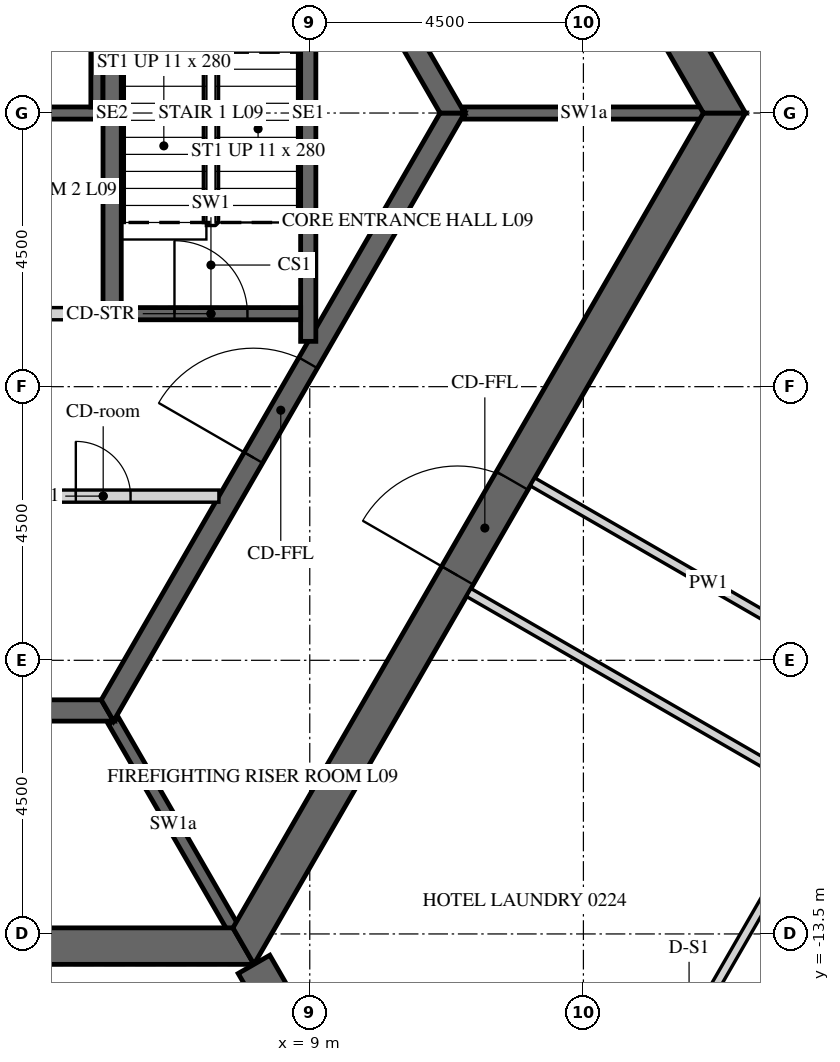
"""IFC4 building model, lengths in metres.
Left out: names, types, materials, properties, quantities, classifications, styles, units other than length and angle.
Written with IfcOpenShell. Run it as: python <this file> out.ifc"""

import sys

from ifc_helpers import new_model, si_unit, direction, frame, frame_2d, origin, place, context, subcontext, project, spatial, polyline, rectangle, outline, extrude, element, fill, save


model = new_model("IFC4")
c1 = context("Model", 3, precision=1e-05, world=origin(), true_north=direction((0.0, 1.0)))
c2 = subcontext(c1, "Body", "Model", "MODEL_VIEW")
j1 = project(units=[si_unit("LENGTHUNIT", "METRE"), si_unit("PLANEANGLEUNIT", "RADIAN")], contexts=[c1])
p1 = place(None, origin())
s1 = spatial("IfcSite", under=j1, at=p1, CompositionType="ELEMENT")
p2 = place(p1, origin())
s2 = spatial("IfcBuilding", under=s1, at=p2, CompositionType="ELEMENT")
p3 = place(p2, frame((0.0, 0.0, 49.2)))
s3 = spatial("IfcBuildingStorey", under=s2, at=p3, CompositionType="ELEMENT", Elevation=49.2)
p4 = place(p3, frame((-7.91, -13.7, -0.15), z_axis=(0.0, 0.0, 1.0), x_axis=(1.0, 0.0, 0.0)))
e1 = element("IfcWall", 1, at=p4, inside=s3, PredefinedType="SHEAR", context=c2, shape_type="SweptSolid", body=[
    extrude(outline(polyline([(-0.173, -0.3), (15.993, -0.3), (15.646, 0.3), (0.173, 0.3), (-0.173, -0.3)])), origin(), (0.0, 0.0, 1.0), 3.9),
])
p5 = place(p4, frame((7.31, 0.0, 0.15)))
e2 = element("IfcOpeningElement", 2, at=p5, cuts=e1, PredefinedType="OPENING", context=c2, shape_type="SweptSolid", body=[
    extrude(rectangle(XDim=1.2, YDim=2.4, at=frame_2d((0.6, 1.2))), frame((0.0, 0.31, 0.0), z_axis=(0.0, -1.0, 0.0), x_axis=(1.0, 0.0, 0.0)), (0.0, 0.0, 1.0), 0.62),
])
p6 = place(p3, frame((7.91, -13.7, -0.15), z_axis=(0.0, 0.0, 1.0), x_axis=(0.499999880136, 0.866025472988, 0.0)))
e3 = element("IfcWall", 3, at=p6, inside=s3, PredefinedType="SHEAR", context=c2, shape_type="SweptSolid", body=[
    extrude(outline(polyline([(-0.173, -0.3), (15.993, -0.3), (15.646, 0.3), (0.173, 0.3), (-0.173, -0.3)])), origin(), (0.0, 0.0, 1.0), 3.9),
])
p7 = place(p6, frame((7.039, 0.0, 0.15)))
e4 = element("IfcOpeningElement", 4, at=p7, cuts=e3, PredefinedType="OPENING", context=c2, shape_type="SweptSolid", body=[
    extrude(rectangle(XDim=1.8, YDim=2.4, at=frame_2d((0.9, 1.2))), frame((0.0, 0.31, 0.0), z_axis=(0.0, -1.0, 0.0), x_axis=(1.0, 0.0, 0.0)), (0.0, 0.0, 1.0), 0.62),
])
p8 = place(p3, frame((15.819, 0.0, -0.15), z_axis=(0.0, 0.0, 1.0), x_axis=(-0.499999880136, 0.866025472988, 0.0)))
e5 = element("IfcWall", 5, at=p8, inside=s3, PredefinedType="SHEAR", context=c2, shape_type="SweptSolid", body=[
    extrude(outline(polyline([(-0.173, -0.3), (15.993, -0.3), (15.646, 0.3), (0.173, 0.3), (-0.173, -0.3)])), origin(), (0.0, 0.0, 1.0), 3.9),
])
p9 = place(p8, frame((6.981, 0.0, 0.15)))
e6 = element("IfcOpeningElement", 6, at=p9, cuts=e5, PredefinedType="OPENING", context=c2, shape_type="SweptSolid", body=[
    extrude(rectangle(XDim=1.8, YDim=2.4, at=frame_2d((0.9, 1.2))), frame((0.0, 0.31, 0.0), z_axis=(0.0, -1.0, 0.0), x_axis=(1.0, 0.0, 0.0)), (0.0, 0.0, 1.0), 0.62),
])
p10 = place(p3, frame((8.083, -14.0, -0.15), z_axis=(0.0, 0.0, 1.0), x_axis=(0.499997680643, -0.866026742862, 0.0)))
e7 = element("IfcWall", 7, at=p10, inside=s3, PredefinedType="SHEAR", context=c2, shape_type="SweptSolid", body=[
    extrude(rectangle(XDim=16.509, YDim=0.6, at=frame_2d((8.254, 0.0))), origin(), (0.0, 0.0, 1.0), 3.9),
])
p11 = place(p10, frame((7.354, 0.0, 0.15)))
e8 = element("IfcOpeningElement", 8, at=p11, cuts=e7, PredefinedType="OPENING", context=c2, shape_type="SweptSolid", body=[
    extrude(rectangle(XDim=1.8, YDim=2.4, at=frame_2d((0.9, 1.2))), frame((0.0, 0.31, 0.0), z_axis=(0.0, -1.0, 0.0), x_axis=(1.0, 0.0, 0.0)), (0.0, 0.0, 1.0), 0.62),
])
p12 = place(p3, frame((-5.673, -9.825, -0.15), z_axis=(0.0, 0.0, 1.0), x_axis=(1.0, 0.0, 0.0)))
e9 = element("IfcWall", 9, at=p12, inside=s3, PredefinedType="SHEAR", context=c2, shape_type="SweptSolid", body=[
    extrude(outline(polyline([(-0.101, -0.175), (11.446, -0.175), (11.244, 0.175), (0.101, 0.175), (-0.101, -0.175)])), origin(), (0.0, 0.0, 1.0), 3.9),
])
p13 = place(p3, frame((5.673, -9.825, -0.15), z_axis=(0.0, 0.0, 1.0), x_axis=(0.499995046907, 0.866028263435, 0.0)))
e10 = element("IfcWall", 10, at=p13, inside=s3, PredefinedType="SHEAR", context=c2, shape_type="SweptSolid", body=[
    extrude(outline(polyline([(-0.101, -0.175), (11.446, -0.175), (11.244, 0.175), (0.101, 0.175), (-0.101, -0.175)])), origin(), (0.0, 0.0, 1.0), 3.9),
])
p14 = place(p13, frame((4.801, 0.0, 0.15)))
e11 = element("IfcOpeningElement", 11, at=p14, cuts=e10, PredefinedType="OPENING", context=c2, shape_type="SweptSolid", body=[
    extrude(rectangle(XDim=1.8, YDim=2.4, at=frame_2d((0.9, 1.2))), frame((0.0, 0.185, 0.0), z_axis=(0.0, -1.0, 0.0), x_axis=(1.0, 0.0, 0.0)), (0.0, 0.0, 1.0), 0.37),
])
p15 = place(p3, frame((11.345, 0.0, -0.15), z_axis=(0.0, 0.0, 1.0), x_axis=(-0.499995046907, 0.866028263435, 0.0)))
e12 = element("IfcWall", 12, at=p15, inside=s3, PredefinedType="SHEAR", context=c2, shape_type="SweptSolid", body=[
    extrude(outline(polyline([(-0.101, -0.175), (11.446, -0.175), (11.244, 0.175), (0.101, 0.175), (-0.101, -0.175)])), origin(), (0.0, 0.0, 1.0), 3.9),
])
p16 = place(p15, frame((4.744, 0.0, 0.15)))
e13 = element("IfcOpeningElement", 13, at=p16, cuts=e12, PredefinedType="OPENING", context=c2, shape_type="SweptSolid", body=[
    extrude(rectangle(XDim=1.8, YDim=2.4, at=frame_2d((0.9, 1.2))), frame((0.0, 0.185, 0.0), z_axis=(0.0, -1.0, 0.0), x_axis=(1.0, 0.0, 0.0)), (0.0, 0.0, 1.0), 0.37),
])
p17 = place(p3, frame((-5.6, 0.0, -0.25), z_axis=(0.0, 0.0, 1.0), x_axis=(1.0, 0.0, 0.0)))
e14 = element("IfcWall", 14, at=p17, inside=s3, PredefinedType="SHEAR", context=c2, shape_type="SweptSolid", body=[
    extrude(rectangle(XDim=11.2, YDim=0.2, at=frame_2d((5.6, 0.0))), origin(), (0.0, 0.0, 1.0), 3.9),
])
p18 = place(p3, frame((5.5, 0.1, -0.25), z_axis=(0.0, 0.0, 1.0), x_axis=(0.0, 1.0, 0.0)))
e15 = element("IfcWall", 15, at=p18, inside=s3, PredefinedType="SHEAR", context=c2, shape_type="SweptSolid", body=[
    extrude(rectangle(XDim=3.1, YDim=0.2, at=frame_2d((1.55, 0.0))), origin(), (0.0, 0.0, 1.0), 3.9),
])
p19 = place(p3, frame((0.1, -3.3, 0.0), z_axis=(0.0, 0.0, 1.0), x_axis=(1.0, 0.0, 0.0)))
e16 = element("IfcWall", 16, at=p19, inside=s3, PredefinedType="PARTITIONING", context=c2, shape_type="SweptSolid", body=[
    extrude(rectangle(XDim=5.5, YDim=0.2, at=frame_2d((2.75, 0.0))), origin(), (0.0, 0.0, 1.0), 3.65),
])
p20 = place(p19, frame((2.3, 0.0, 0.0)))
e17 = element("IfcOpeningElement", 17, at=p20, cuts=e16, PredefinedType="OPENING", context=c2, shape_type="SweptSolid", body=[
    extrude(rectangle(XDim=0.9, YDim=2.1, at=frame_2d((0.45, 1.05))), frame((0.0, 0.11, 0.0), z_axis=(0.0, -1.0, 0.0), x_axis=(1.0, 0.0, 0.0)), (0.0, 0.0, 1.0), 0.22),
])
p21 = place(p3, frame((3.7, -6.3, 0.0), z_axis=(0.0, 0.0, 1.0), x_axis=(1.0, 0.0, 0.0)))
e18 = element("IfcWall", 18, at=p21, inside=s3, PredefinedType="PARTITIONING", context=c2, shape_type="SweptSolid", body=[
    extrude(rectangle(XDim=3.806, YDim=0.2, at=frame_2d((1.903, 0.0))), origin(), (0.0, 0.0, 1.0), 3.65),
])
p22 = place(p21, frame((1.453, 0.0, 0.0)))
e19 = element("IfcOpeningElement", 19, at=p22, cuts=e18, PredefinedType="OPENING", context=c2, shape_type="SweptSolid", body=[
    extrude(rectangle(XDim=0.9, YDim=2.1, at=frame_2d((0.45, 1.05))), frame((0.0, 0.11, 0.0), z_axis=(0.0, -1.0, 0.0), x_axis=(1.0, 0.0, 0.0)), (0.0, 0.0, 1.0), 0.22),
])
p23 = place(p3, frame((11.547, 0.0, -0.15), z_axis=(0.0, 0.0, 1.0), x_axis=(1.0, 0.0, 0.0)))
e20 = element("IfcWall", 20, at=p23, inside=s3, PredefinedType="SHEAR", context=c2, shape_type="SweptSolid", body=[
    extrude(rectangle(XDim=3.926, YDim=0.2, at=frame_2d((1.963, 0.0))), origin(), (0.0, 0.0, 1.0), 3.9),
])
p24 = place(p3, frame((5.773, -10.0, -0.15), z_axis=(0.0, 0.0, 1.0), x_axis=(0.500038251005, -0.86600331843, 0.0)))
e21 = element("IfcWall", 21, at=p24, inside=s3, PredefinedType="SHEAR", context=c2, shape_type="SweptSolid", body=[
    extrude(rectangle(XDim=3.926, YDim=0.2, at=frame_2d((1.963, 0.0))), origin(), (0.0, 0.0, 1.0), 3.9),
])
p25 = place(p3, frame((5.75, -3.4, -0.25), z_axis=(0.0, 0.0, 1.0), x_axis=(0.0, 1.0, 0.0)))
e22 = element("IfcWall", 22, at=p25, inside=s3, PredefinedType="SHEAR", context=c2, shape_type="SweptSolid", body=[
    extrude(rectangle(XDim=6.8, YDim=0.3, at=frame_2d((3.4, 0.0))), origin(), (0.0, 0.0, 1.0), 3.9),
])
p26 = place(p3, frame((8.975, -3.755, -0.25), z_axis=(0.0, 0.0, 1.0), x_axis=(0.0, 1.0, 0.0)))
e23 = element("IfcWall", 23, at=p26, inside=s3, PredefinedType="SHEAR", context=c2, shape_type="SweptSolid", body=[
    extrude(rectangle(XDim=7.51, YDim=0.25, at=frame_2d((3.755, 0.0))), origin(), (0.0, 0.0, 1.0), 3.9),
])
p27 = place(p3, frame((5.9, -3.3, -0.25), z_axis=(0.0, 0.0, 1.0), x_axis=(1.0, 0.0, 0.0)))
e24 = element("IfcWall", 24, at=p27, inside=s3, PredefinedType="SHEAR", context=c2, shape_type="SweptSolid", body=[
    extrude(rectangle(XDim=2.95, YDim=0.2, at=frame_2d((1.475, 0.0))), origin(), (0.0, 0.0, 1.0), 3.9),
])
p28 = place(p27, frame((0.875, 0.0, 0.25)))
e25 = element("IfcOpeningElement", 25, at=p28, cuts=e24, PredefinedType="OPENING", context=c2, shape_type="SweptSolid", body=[
    extrude(rectangle(XDim=1.2, YDim=2.4, at=frame_2d((0.6, 1.2))), frame((0.0, 0.11, 0.0), z_axis=(0.0, -1.0, 0.0), x_axis=(1.0, 0.0, 0.0)), (0.0, 0.0, 1.0), 0.22),
])
p29 = place(p3, frame((14.275, -20.375, 0.0), z_axis=(0.0, 0.0, 1.0), x_axis=(0.500001098408, 0.866024769617, 0.0)))
e26 = element("IfcWall", 26, at=p29, inside=s3, PredefinedType="PARTITIONING", context=c2, shape_type="SweptSolid", body=[
    extrude(rectangle(XDim=24.599, YDim=0.15, at=frame_2d((12.299, 0.0))), origin(), (0.0, 0.0, 1.0), 2.988),
])
p30 = place(p29, frame((3.016, 0.0, 0.0)))
e27 = element("IfcOpeningElement", 27, at=p30, cuts=e26, PredefinedType="OPENING", context=c2, shape_type="SweptSolid", body=[
    extrude(rectangle(XDim=1.0, YDim=2.1, at=frame_2d((0.5, 1.05))), frame((0.0, 0.085, 0.0), z_axis=(0.0, -1.0, 0.0), x_axis=(1.0, 0.0, 0.0)), (0.0, 0.0, 1.0), 0.17),
])
p31 = place(p29, frame((10.019, 0.0, 0.0)))
e28 = element("IfcOpeningElement", 28, at=p31, cuts=e26, PredefinedType="OPENING", context=c2, shape_type="SweptSolid", body=[
    extrude(rectangle(XDim=1.0, YDim=2.1, at=frame_2d((0.5, 1.05))), frame((0.0, 0.085, 0.0), z_axis=(0.0, -1.0, 0.0), x_axis=(1.0, 0.0, 0.0)), (0.0, 0.0, 1.0), 0.17),
])
p32 = place(p29, frame((22.459, 0.0, 0.0)))
e29 = element("IfcOpeningElement", 29, at=p32, cuts=e26, PredefinedType="OPENING", context=c2, shape_type="SweptSolid", body=[
    extrude(rectangle(XDim=1.0, YDim=2.1, at=frame_2d((0.5, 1.05))), frame((0.0, 0.085, 0.0), z_axis=(0.0, -1.0, 0.0), x_axis=(1.0, 0.0, 0.0)), (0.0, 0.0, 1.0), 0.17),
])
p33 = place(p3, frame((26.528, 0.997, 0.0), z_axis=(0.0, 0.0, 1.0), x_axis=(-0.559192121846, 0.829038099767, 0.0)))
e30 = element("IfcWall", 30, at=p33, inside=s3, PredefinedType="PARTITIONING", context=c2, shape_type="SweptSolid", body=[
    extrude(rectangle(XDim=22.586, YDim=0.15, at=frame_2d((11.293, 0.0))), origin(), (0.0, 0.0, 1.0), 2.988),
])
p34 = place(p33, frame((11.696, 0.0, 0.0)))
e31 = element("IfcOpeningElement", 31, at=p34, cuts=e30, PredefinedType="OPENING", context=c2, shape_type="SweptSolid", body=[
    extrude(rectangle(XDim=1.0, YDim=2.1, at=frame_2d((0.5, 1.05))), frame((0.0, 0.085, 0.0), z_axis=(0.0, -1.0, 0.0), x_axis=(1.0, 0.0, 0.0)), (0.0, 0.0, 1.0), 0.17),
])
p35 = place(p33, frame((17.733, 0.0, 0.0)))
e32 = element("IfcOpeningElement", 32, at=p35, cuts=e30, PredefinedType="OPENING", context=c2, shape_type="SweptSolid", body=[
    extrude(rectangle(XDim=1.0, YDim=2.1, at=frame_2d((0.5, 1.05))), frame((0.0, 0.085, 0.0), z_axis=(0.0, -1.0, 0.0), x_axis=(1.0, 0.0, 0.0)), (0.0, 0.0, 1.0), 0.17),
])
p36 = place(p3, frame((18.445, -9.403, 0.0), z_axis=(0.0, 0.0, 1.0), x_axis=(-0.866033317326, 0.499986293093, 0.0)))
e33 = element("IfcWall", 33, at=p36, inside=s3, PredefinedType="PARTITIONING", context=c2, shape_type="SweptSolid", body=[
    extrude(rectangle(XDim=6.675, YDim=0.15, at=frame_2d((3.337, 0.0))), origin(), (0.0, 0.0, 1.0), 2.988),
])
p37 = place(p3, frame((11.614, -7.884, 0.0), z_axis=(0.0, 0.0, 1.0), x_axis=(0.866026575979, -0.499997969693, 0.0)))
e34 = element("IfcWall", 34, at=p37, inside=s3, PredefinedType="PARTITIONING", context=c2, shape_type="SweptSolid", body=[
    extrude(rectangle(XDim=6.75, YDim=0.15, at=frame_2d((3.375, 0.0))), origin(), (0.0, 0.0, 1.0), 2.988),
])
p38 = place(p3, frame((17.422, -11.324, 0.0), z_axis=(0.0, 0.0, 1.0), x_axis=(-0.499994979726, -0.866028302222, 0.0)))
e35 = element("IfcWall", 35, at=p38, inside=s3, PredefinedType="PARTITIONING", context=c2, shape_type="SweptSolid", body=[
    extrude(rectangle(XDim=8.737, YDim=0.15, at=frame_2d((4.368, 0.0))), origin(), (0.0, 0.0, 1.0), 2.988),
])
p39 = place(p38, frame((3.918, 0.0, 0.0)))
e36 = element("IfcOpeningElement", 36, at=p39, cuts=e35, PredefinedType="OPENING", context=c2, shape_type="SweptSolid", body=[
    extrude(rectangle(XDim=0.9, YDim=2.1, at=frame_2d((0.45, 1.05))), frame((0.0, 0.085, 0.0), z_axis=(0.0, -1.0, 0.0), x_axis=(1.0, 0.0, 0.0)), (0.0, 0.0, 1.0), 0.17),
])
p40 = place(p7, origin())
e37 = element("IfcDoor", 37, at=p40, inside=s3, OperationType="DOUBLE_DOOR_SINGLE_SWING", PredefinedType="DOOR", context=c2, shape_type="SweptSolid", body=[
    extrude(rectangle(XDim=1.8, YDim=2.4, at=frame_2d((0.9, 1.2))), frame((0.0, 0.025, 0.0), z_axis=(0.0, -1.0, 0.0), x_axis=(1.0, 0.0, 0.0)), (0.0, 0.0, 1.0), 0.05),
])
fill(e4, e37)
p41 = place(p14, origin())
e38 = element("IfcDoor", 38, at=p41, inside=s3, OperationType="DOUBLE_DOOR_SINGLE_SWING", PredefinedType="DOOR", context=c2, shape_type="SweptSolid", body=[
    extrude(rectangle(XDim=1.8, YDim=2.4, at=frame_2d((0.9, 1.2))), frame((0.0, 0.025, 0.0), z_axis=(0.0, -1.0, 0.0), x_axis=(1.0, 0.0, 0.0)), (0.0, 0.0, 1.0), 0.05),
])
fill(e11, e38)
p42 = place(p22, origin())
e39 = element("IfcDoor", 39, at=p42, inside=s3, OperationType="SINGLE_SWING_LEFT", PredefinedType="DOOR", context=c2, shape_type="SweptSolid", body=[
    extrude(rectangle(XDim=0.9, YDim=2.1, at=frame_2d((0.45, 1.05))), frame((0.0, 0.025, 0.0), z_axis=(0.0, -1.0, 0.0), x_axis=(1.0, 0.0, 0.0)), (0.0, 0.0, 1.0), 0.05),
])
fill(e19, e39)
p43 = place(p28, origin())
e40 = element("IfcDoor", 40, at=p43, inside=s3, OperationType="SINGLE_SWING_LEFT", PredefinedType="DOOR", context=c2, shape_type="SweptSolid", body=[
    extrude(rectangle(XDim=1.2, YDim=2.4, at=frame_2d((0.6, 1.2))), frame((0.0, 0.025, 0.0), z_axis=(0.0, -1.0, 0.0), x_axis=(1.0, 0.0, 0.0)), (0.0, 0.0, 1.0), 0.05),
])
fill(e25, e40)
save(model, sys.argv[1])
